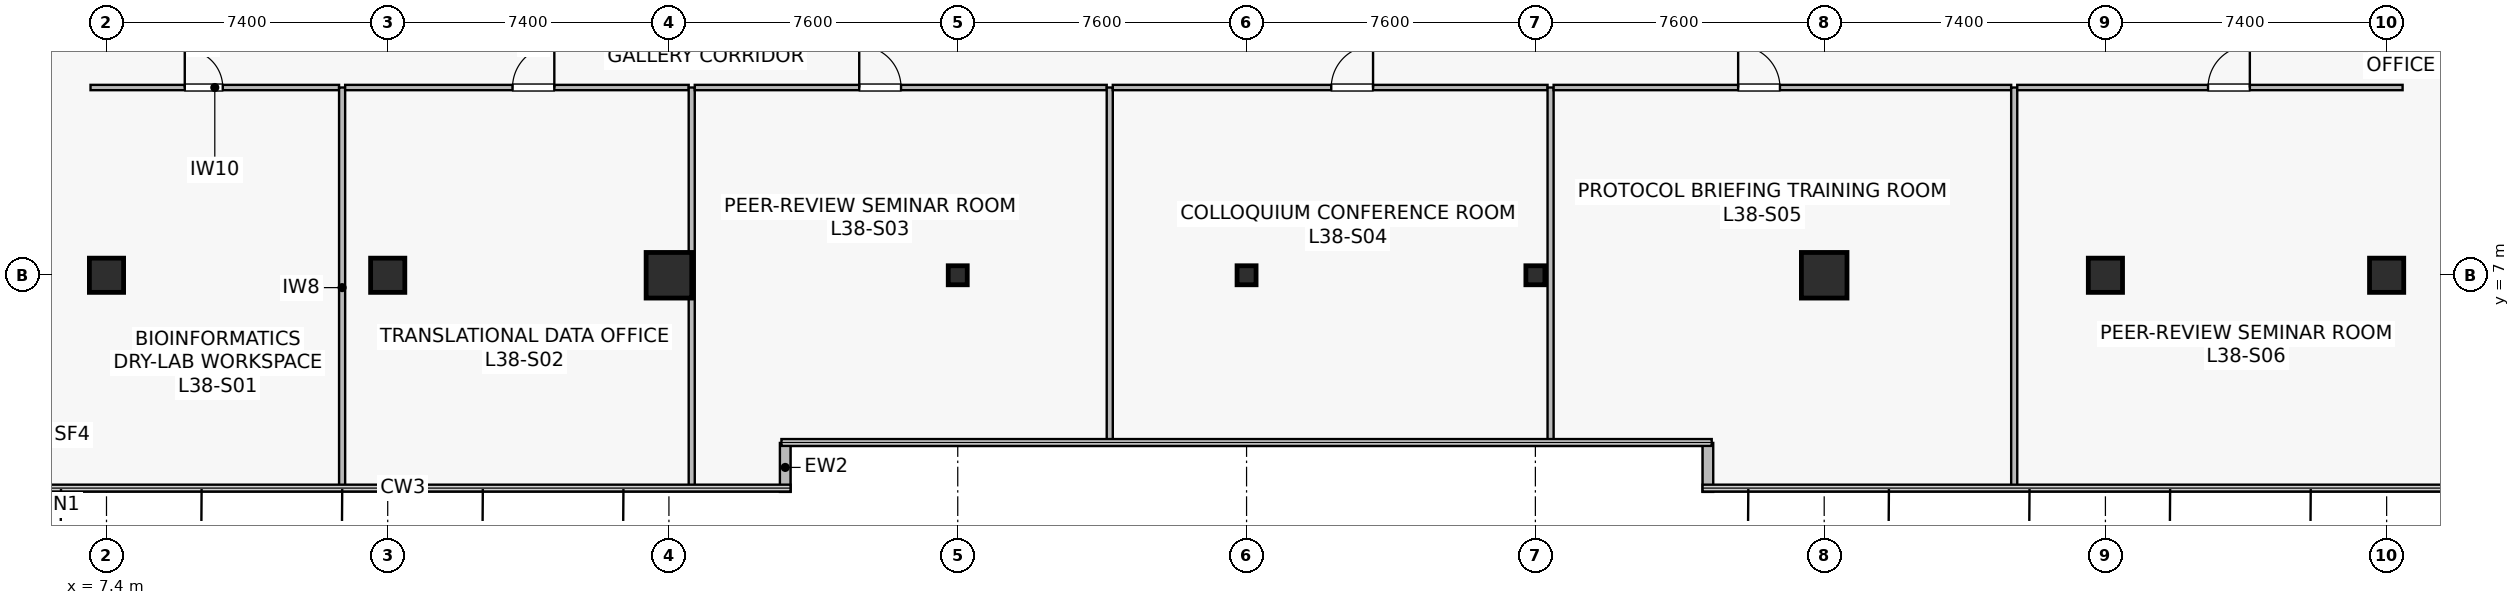
"""IFC4 building model, lengths in metres.
Left out: names, types, materials, properties, quantities, classifications, styles, units other than length and angle.
Written with IfcOpenShell. Run it as: python <this file> out.ifc"""

import sys

from ifc_helpers import new_model, si_unit, direction, frame, frame_2d, origin, origin_2d, place, context, subcontext, project, spatial, rectangle, hollow_rectangle, extrude, source, transform, mapped, element, fill, save


model = new_model("IFC4")
c1 = context("Model", 3, precision=1e-05, world=origin(), true_north=direction((0.0, 1.0)))
c2 = subcontext(c1, "Body", "Model", "MODEL_VIEW")
j1 = project(units=[si_unit("LENGTHUNIT", "METRE"), si_unit("PLANEANGLEUNIT", "RADIAN")], contexts=[c1])
p1 = place(None, origin())
s1 = spatial("IfcSite", under=j1, at=p1, CompositionType="ELEMENT")
p2 = place(p1, origin())
s2 = spatial("IfcBuilding", under=s1, at=p2, CompositionType="ELEMENT")
p3 = place(p2, frame((0.0, 0.0, 158.4)))
s3 = spatial("IfcBuildingStorey", under=s2, at=p3, CompositionType="ELEMENT", Elevation=158.4)
m1 = source(origin(), c2, "Body", "SweptSolid", [
    extrude(rectangle(XDim=0.9, YDim=0.9, at=origin_2d()), origin(), (0.0, 0.0, 1.0), 4.1),
])
p4 = place(p3, frame((14.8, 7.0, 0.0), z_axis=(0.0, 0.0, 1.0), x_axis=(1.0, 0.0, 0.0)))
e1 = element("IfcColumn", 1, at=p4, inside=s3, PredefinedType="COLUMN", context=c2, shape_type="MappedRepresentation", body=[
    mapped(m1, transform((0.0, 0.0, 0.0), scale=1.0)),
])
m2 = source(origin(), c2, "Body", "SweptSolid", [
    extrude(rectangle(XDim=1.2, YDim=1.2, at=origin_2d()), origin(), (0.0, 0.0, 1.0), 4.1),
])
for number, where, z_axis, x_axis in (
    (2, (22.2, 7.0, 0.0), (0.0, 0.0, 1.0), (1.0, 0.0, 0.0)),
    (3, (52.6, 7.0, 0.0), (0.0, 0.0, 1.0), (1.0, 0.0, 0.0)),
):
    element("IfcColumn", number, at=place(p3, frame(where, z_axis=z_axis, x_axis=x_axis)), inside=s3, PredefinedType="COLUMN", context=c2, shape_type="MappedRepresentation", body=[
        mapped(m2, transform((0.0, 0.0, 0.0), scale=1.0)),
    ])
for number, where, z_axis, x_axis in (
    (4, (60.0, 7.0, 0.0), (0.0, 0.0, 1.0), (1.0, 0.0, 0.0)),
    (5, (7.4, 7.0, 0.0), (0.0, 0.0, 1.0), (1.0, 0.0, 0.0)),
    (6, (67.4, 7.0, 0.0), (0.0, 0.0, 1.0), (1.0, 0.0, 0.0)),
):
    element("IfcColumn", number, at=place(p3, frame(where, z_axis=z_axis, x_axis=x_axis)), inside=s3, PredefinedType="COLUMN", context=c2, shape_type="MappedRepresentation", body=[
        mapped(m1, transform((0.0, 0.0, 0.0), scale=1.0)),
    ])
m3 = source(origin(), c2, "Body", "SweptSolid", [
    extrude(hollow_rectangle(XDim=0.5, YDim=0.5, WallThickness=0.022, at=origin_2d()), origin(), (0.0, 0.0, 1.0), 4.1),
])
for number, where, z_axis, x_axis in (
    (7, (29.8, 7.0, 0.0), (0.0, 0.0, 1.0), (1.0, 0.0, 0.0)),
    (8, (37.4, 7.0, 0.0), (0.0, 0.0, 1.0), (1.0, 0.0, 0.0)),
    (9, (45.0, 7.0, 0.0), (0.0, 0.0, 1.0), (1.0, 0.0, 0.0)),
):
    element("IfcColumn", number, at=place(p3, frame(where, z_axis=z_axis, x_axis=x_axis)), inside=s3, PredefinedType="COLUMN", context=c2, shape_type="MappedRepresentation", body=[
        mapped(m3, transform((0.0, 0.0, 0.0), scale=1.0)),
    ])
for number, where, z_axis, x_axis in (
    (10, (25.26, 1.3, 0.0), (0.0, 0.0, 1.0), (0.0, 1.0, 0.0)),
    (11, (49.54, 2.588, 0.0), (0.0, 0.0, 1.0), (0.0, -1.0, 0.0)),
):
    element("IfcWall", number, at=place(p3, frame(where, z_axis=z_axis, x_axis=x_axis)), inside=s3, PredefinedType="STANDARD", context=c2, shape_type="SweptSolid", body=[
        extrude(rectangle(XDim=1.288, YDim=0.28, at=frame_2d((0.644, 0.0))), origin(), (0.0, 0.0, 1.0), 3.79),
    ])
p5 = place(p3, frame((6.98, 11.94, 0.0), z_axis=(0.0, 0.0, 1.0), x_axis=(1.0, 0.0, 0.0)))
e12 = element("IfcWall", 12, at=p5, inside=s3, PredefinedType="PARTITIONING", context=c2, shape_type="SweptSolid", body=[
    extrude(rectangle(XDim=6.54, YDim=0.14, at=frame_2d((3.27, 0.0))), origin(), (0.0, 0.0, 1.0), 3.275),
])
p6 = place(p5, frame((2.479, 0.0, 0.0)))
e13 = element("IfcOpeningElement", 13, at=p6, cuts=e12, PredefinedType="OPENING", context=c2, shape_type="SweptSolid", body=[
    extrude(rectangle(XDim=1.0, YDim=2.15, at=frame_2d((0.5, 1.075))), frame((0.0, 0.08, 0.0), z_axis=(0.0, -1.0, 0.0), x_axis=(1.0, 0.0, 0.0)), (0.0, 0.0, 1.0), 0.16),
])
p7 = place(p3, frame((13.6, 1.41, 0.0), z_axis=(0.0, 0.0, 1.0), x_axis=(0.0, 1.0, 0.0)))
e14 = element("IfcWall", 14, at=p7, inside=s3, PredefinedType="PARTITIONING", context=c2, shape_type="SweptSolid", body=[
    extrude(rectangle(XDim=10.53, YDim=0.16, at=frame_2d((5.265, 0.0))), origin(), (0.0, 0.0, 1.0), 3.075),
])
p8 = place(p3, frame((13.68, 11.94, 0.0), z_axis=(0.0, 0.0, 1.0), x_axis=(1.0, 0.0, 0.0)))
e15 = element("IfcWall", 15, at=p8, inside=s3, PredefinedType="PARTITIONING", context=c2, shape_type="SweptSolid", body=[
    extrude(rectangle(XDim=9.04, YDim=0.14, at=frame_2d((4.52, 0.0))), origin(), (0.0, 0.0, 1.0), 3.187),
])
p9 = place(p8, frame((4.404, 0.0, 0.0)))
e16 = element("IfcOpeningElement", 16, at=p9, cuts=e15, PredefinedType="OPENING", context=c2, shape_type="SweptSolid", body=[
    extrude(rectangle(XDim=1.1, YDim=2.18, at=frame_2d((0.55, 1.09))), frame((0.0, 0.08, 0.0), z_axis=(0.0, -1.0, 0.0), x_axis=(1.0, 0.0, 0.0)), (0.0, 0.0, 1.0), 0.16),
])
p10 = place(p3, frame((22.8, 1.41, 0.0), z_axis=(0.0, 0.0, 1.0), x_axis=(0.0, 1.0, 0.0)))
e17 = element("IfcWall", 17, at=p10, inside=s3, PredefinedType="PARTITIONING", context=c2, shape_type="SweptSolid", body=[
    extrude(rectangle(XDim=10.53, YDim=0.16, at=frame_2d((5.265, 0.0))), origin(), (0.0, 0.0, 1.0), 3.075),
])
p11 = place(p3, frame((22.88, 11.94, 0.0), z_axis=(0.0, 0.0, 1.0), x_axis=(1.0, 0.0, 0.0)))
e18 = element("IfcWall", 18, at=p11, inside=s3, PredefinedType="PARTITIONING", context=c2, shape_type="SweptSolid", body=[
    extrude(rectangle(XDim=10.84, YDim=0.14, at=frame_2d((5.42, 0.0))), origin(), (0.0, 0.0, 1.0), 3.187),
])
p12 = place(p11, frame((4.328, 0.0, 0.0)))
e19 = element("IfcOpeningElement", 19, at=p12, cuts=e18, PredefinedType="OPENING", context=c2, shape_type="SweptSolid", body=[
    extrude(rectangle(XDim=1.1, YDim=2.18, at=frame_2d((0.55, 1.09))), frame((0.0, 0.08, 0.0), z_axis=(0.0, -1.0, 0.0), x_axis=(1.0, 0.0, 0.0)), (0.0, 0.0, 1.0), 0.16),
])
p13 = place(p3, frame((33.8, 2.61, 0.0), z_axis=(0.0, 0.0, 1.0), x_axis=(0.0, 1.0, 0.0)))
e20 = element("IfcWall", 20, at=p13, inside=s3, PredefinedType="PARTITIONING", context=c2, shape_type="SweptSolid", body=[
    extrude(rectangle(XDim=9.33, YDim=0.16, at=frame_2d((4.665, 0.0))), origin(), (0.0, 0.0, 1.0), 3.075),
])
p14 = place(p3, frame((33.88, 11.94, 0.0), z_axis=(0.0, 0.0, 1.0), x_axis=(1.0, 0.0, 0.0)))
e21 = element("IfcWall", 21, at=p14, inside=s3, PredefinedType="PARTITIONING", context=c2, shape_type="SweptSolid", body=[
    extrude(rectangle(XDim=11.44, YDim=0.14, at=frame_2d((5.72, 0.0))), origin(), (0.0, 0.0, 1.0), 3.187),
])
p15 = place(p14, frame((5.748, 0.0, 0.0)))
e22 = element("IfcOpeningElement", 22, at=p15, cuts=e21, PredefinedType="OPENING", context=c2, shape_type="SweptSolid", body=[
    extrude(rectangle(XDim=1.1, YDim=2.18, at=frame_2d((0.55, 1.09))), frame((0.0, 0.08, 0.0), z_axis=(0.0, -1.0, 0.0), x_axis=(1.0, 0.0, 0.0)), (0.0, 0.0, 1.0), 0.16),
])
p16 = place(p3, frame((45.4, 2.61, 0.0), z_axis=(0.0, 0.0, 1.0), x_axis=(0.0, 1.0, 0.0)))
e23 = element("IfcWall", 23, at=p16, inside=s3, PredefinedType="PARTITIONING", context=c2, shape_type="SweptSolid", body=[
    extrude(rectangle(XDim=9.33, YDim=0.16, at=frame_2d((4.665, 0.0))), origin(), (0.0, 0.0, 1.0), 3.075),
])
p17 = place(p3, frame((45.48, 11.94, 0.0), z_axis=(0.0, 0.0, 1.0), x_axis=(1.0, 0.0, 0.0)))
e24 = element("IfcWall", 24, at=p17, inside=s3, PredefinedType="PARTITIONING", context=c2, shape_type="SweptSolid", body=[
    extrude(rectangle(XDim=12.04, YDim=0.14, at=frame_2d((6.02, 0.0))), origin(), (0.0, 0.0, 1.0), 3.187),
])
p18 = place(p17, frame((4.856, 0.0, 0.0)))
e25 = element("IfcOpeningElement", 25, at=p18, cuts=e24, PredefinedType="OPENING", context=c2, shape_type="SweptSolid", body=[
    extrude(rectangle(XDim=1.1, YDim=2.18, at=frame_2d((0.55, 1.09))), frame((0.0, 0.08, 0.0), z_axis=(0.0, -1.0, 0.0), x_axis=(1.0, 0.0, 0.0)), (0.0, 0.0, 1.0), 0.16),
])
p19 = place(p3, frame((57.6, 1.41, 0.0), z_axis=(0.0, 0.0, 1.0), x_axis=(0.0, 1.0, 0.0)))
e26 = element("IfcWall", 26, at=p19, inside=s3, PredefinedType="PARTITIONING", context=c2, shape_type="SweptSolid", body=[
    extrude(rectangle(XDim=10.53, YDim=0.16, at=frame_2d((5.265, 0.0))), origin(), (0.0, 0.0, 1.0), 3.075),
])
p20 = place(p3, frame((57.68, 11.94, 0.0), z_axis=(0.0, 0.0, 1.0), x_axis=(1.0, 0.0, 0.0)))
e27 = element("IfcWall", 27, at=p20, inside=s3, PredefinedType="PARTITIONING", context=c2, shape_type="SweptSolid", body=[
    extrude(rectangle(XDim=10.14, YDim=0.14, at=frame_2d((5.07, 0.0))), origin(), (0.0, 0.0, 1.0), 3.187),
])
p21 = place(p20, frame((5.021, 0.0, 0.0)))
e28 = element("IfcOpeningElement", 28, at=p21, cuts=e27, PredefinedType="OPENING", context=c2, shape_type="SweptSolid", body=[
    extrude(rectangle(XDim=1.1, YDim=2.18, at=frame_2d((0.55, 1.09))), frame((0.0, 0.08, 0.0), z_axis=(0.0, -1.0, 0.0), x_axis=(1.0, 0.0, 0.0)), (0.0, 0.0, 1.0), 0.16),
])
m4 = source(origin(), c2, "Body", "SweptSolid", [
    extrude(rectangle(XDim=1.0, YDim=2.15, at=frame_2d((0.5, 1.075))), frame((0.0, 0.025, 0.0), z_axis=(0.0, -1.0, 0.0), x_axis=(1.0, 0.0, 0.0)), (0.0, 0.0, 1.0), 0.05),
])
p22 = place(p6, origin())
e29 = element("IfcDoor", 29, at=p22, inside=s3, OperationType="SINGLE_SWING_LEFT", PredefinedType="DOOR", context=c2, shape_type="MappedRepresentation", body=[
    mapped(m4, transform((0.0, 0.0, 0.0), scale=1.0)),
])
fill(e13, e29)
m5 = source(origin(), c2, "Body", "SweptSolid", [
    extrude(rectangle(XDim=1.1, YDim=2.18, at=frame_2d((0.55, 1.09))), frame((0.0, 0.025, 0.0), z_axis=(0.0, -1.0, 0.0), x_axis=(1.0, 0.0, 0.0)), (0.0, 0.0, 1.0), 0.05),
])
p23 = place(p9, origin())
e30 = element("IfcDoor", 30, at=p23, inside=s3, OperationType="SINGLE_SWING_RIGHT", PredefinedType="DOOR", context=c2, shape_type="MappedRepresentation", body=[
    mapped(m5, transform((0.0, 0.0, 0.0), scale=1.0)),
])
fill(e16, e30)
p24 = place(p12, origin())
e31 = element("IfcDoor", 31, at=p24, inside=s3, OperationType="SINGLE_SWING_LEFT", PredefinedType="DOOR", context=c2, shape_type="MappedRepresentation", body=[
    mapped(m5, transform((0.0, 0.0, 0.0), scale=1.0)),
])
fill(e19, e31)
p25 = place(p15, origin())
e32 = element("IfcDoor", 32, at=p25, inside=s3, OperationType="SINGLE_SWING_RIGHT", PredefinedType="DOOR", context=c2, shape_type="MappedRepresentation", body=[
    mapped(m5, transform((0.0, 0.0, 0.0), scale=1.0)),
])
fill(e22, e32)
p26 = place(p18, origin())
e33 = element("IfcDoor", 33, at=p26, inside=s3, OperationType="SINGLE_SWING_LEFT", PredefinedType="DOOR", context=c2, shape_type="MappedRepresentation", body=[
    mapped(m5, transform((0.0, 0.0, 0.0), scale=1.0)),
])
fill(e25, e33)
p27 = place(p21, origin())
e34 = element("IfcDoor", 34, at=p27, inside=s3, OperationType="SINGLE_SWING_RIGHT", PredefinedType="DOOR", context=c2, shape_type="MappedRepresentation", body=[
    mapped(m5, transform((0.0, 0.0, 0.0), scale=1.0)),
])
fill(e28, e34)
save(model, sys.argv[1])
